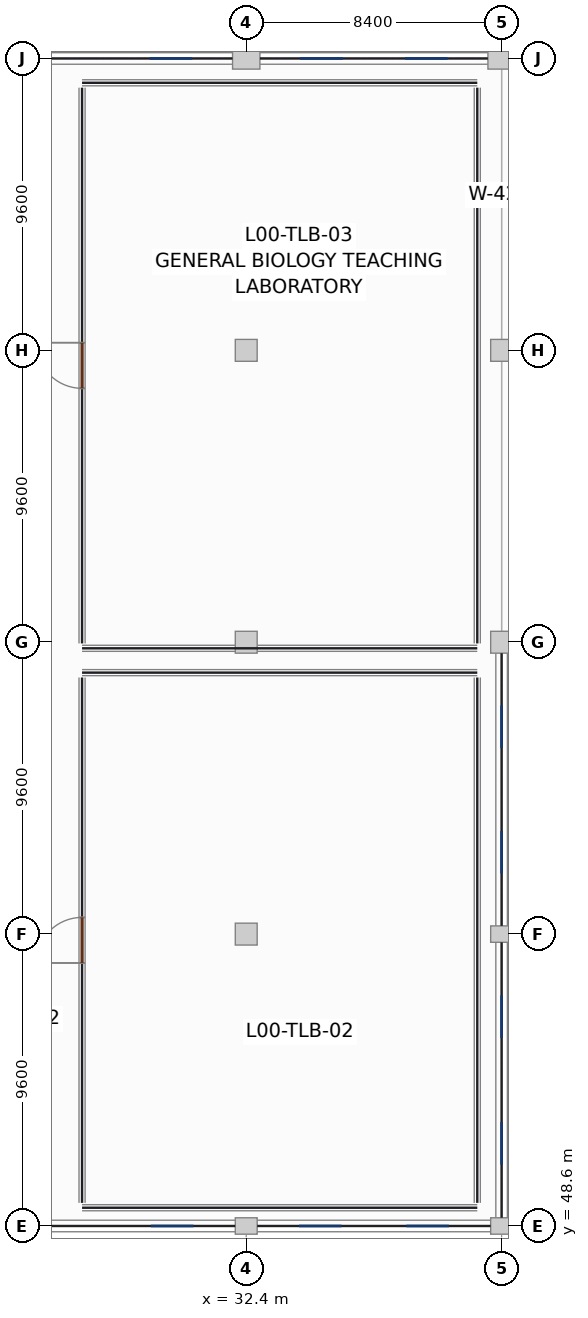
"""IFC4 building model, lengths in metres.
Left out: names, types, materials, properties, quantities, classifications, styles, units other than length and angle.
Written with IfcOpenShell. Run it as: python <this file> out.ifc"""

import sys

from ifc_helpers import new_model, si_unit, direction, frame, frame_2d, origin, origin_2d, place, context, subcontext, project, spatial, rectangle, extrude, element, fill, save


model = new_model("IFC4")
c1 = context("Model", 3, precision=1e-05, world=origin(), true_north=direction((0.0, 1.0)))
c2 = subcontext(c1, "Body", "Model", "MODEL_VIEW")
j1 = project(units=[si_unit("LENGTHUNIT", "METRE"), si_unit("PLANEANGLEUNIT", "RADIAN")], contexts=[c1])
p1 = place(None, origin())
s1 = spatial("IfcSite", under=j1, at=p1, CompositionType="ELEMENT")
p2 = place(p1, origin())
s2 = spatial("IfcBuilding", under=s1, at=p2, CompositionType="ELEMENT")
p3 = place(p2, origin())
s3 = spatial("IfcBuildingStorey", under=s2, at=p3, CompositionType="ELEMENT", Elevation=0.0)
p4 = place(p3, frame((32.4, 48.6, 0.0), z_axis=(0.0, 0.0, 1.0), x_axis=(1.0, 0.0, 0.0)))
e1 = element("IfcColumn", 1, at=p4, inside=s3, PredefinedType="COLUMN", context=c2, shape_type="SweptSolid", body=[
    extrude(rectangle(XDim=0.72, YDim=0.54, at=origin_2d()), origin(), (0.0, 0.0, 1.0), 5.08),
])
for number, where, z_axis, x_axis in (
    (2, (32.4, 58.2, 0.0), (0.0, 0.0, 1.0), (1.0, 0.0, 0.0)),
    (3, (32.4, 67.8, 0.0), (0.0, 0.0, 1.0), (1.0, 0.0, 0.0)),
    (4, (32.4, 77.4, 0.0), (0.0, 0.0, 1.0), (1.0, 0.0, 0.0)),
):
    element("IfcColumn", number, at=place(p3, frame(where, z_axis=z_axis, x_axis=x_axis)), inside=s3, PredefinedType="COLUMN", context=c2, shape_type="SweptSolid", body=[
        extrude(rectangle(XDim=0.72, YDim=0.72, at=origin_2d()), origin(), (0.0, 0.0, 1.0), 5.08),
    ])
p5 = place(p3, frame((32.4, 87.0, 0.0), z_axis=(0.0, 0.0, 1.0), x_axis=(1.0, 0.0, 0.0)))
e5 = element("IfcColumn", 5, at=p5, inside=s3, PredefinedType="COLUMN", context=c2, shape_type="SweptSolid", body=[
    extrude(rectangle(XDim=0.9, YDim=0.7, at=origin_2d()), origin(), (0.0, 0.0, 1.0), 5.08),
])
for number, where, z_axis, x_axis in (
    (6, (40.8, 48.6, 0.0), (0.0, 0.0, 1.0), (1.0, 0.0, 0.0)),
    (7, (40.8, 58.2, 0.0), (0.0, 0.0, 1.0), (1.0, 0.0, 0.0)),
):
    element("IfcColumn", number, at=place(p3, frame(where, z_axis=z_axis, x_axis=x_axis)), inside=s3, PredefinedType="COLUMN", context=c2, shape_type="SweptSolid", body=[
        extrude(rectangle(XDim=0.72, YDim=0.54, at=origin_2d()), origin(), (0.0, 0.0, 1.0), 5.08),
    ])
for number, where, z_axis, x_axis in (
    (8, (40.8, 67.8, 0.0), (0.0, 0.0, 1.0), (1.0, 0.0, 0.0)),
    (9, (40.8, 77.4, 0.0), (0.0, 0.0, 1.0), (1.0, 0.0, 0.0)),
):
    element("IfcColumn", number, at=place(p3, frame(where, z_axis=z_axis, x_axis=x_axis)), inside=s3, PredefinedType="COLUMN", context=c2, shape_type="SweptSolid", body=[
        extrude(rectangle(XDim=0.72, YDim=0.72, at=origin_2d()), origin(), (0.0, 0.0, 1.0), 5.08),
    ])
p6 = place(p3, frame((40.8, 87.0, 0.0), z_axis=(0.0, 0.0, 1.0), x_axis=(1.0, 0.0, 0.0)))
e10 = element("IfcColumn", 10, at=p6, inside=s3, PredefinedType="COLUMN", context=c2, shape_type="SweptSolid", body=[
    extrude(rectangle(XDim=0.9, YDim=0.7, at=origin_2d()), origin(), (0.0, 0.0, 1.0), 5.08),
])
p7 = place(p3, frame((40.8, 48.872, 0.0), z_axis=(0.0, 0.0, 1.0), x_axis=(0.0, 1.0, 0.0)))
e11 = element("IfcWall", 11, at=p7, inside=s3, PredefinedType="SOLIDWALL", context=c2, shape_type="SweptSolid", body=[
    extrude(rectangle(XDim=9.056, YDim=0.38, at=frame_2d((4.528, 0.0))), origin(), (0.0, 0.0, 1.0), 4.28),
])
p8 = place(p7, frame((1.745, 0.0, 0.85)))
e12 = element("IfcOpeningElement", 12, at=p8, cuts=e11, PredefinedType="OPENING", context=c2, shape_type="SweptSolid", body=[
    extrude(rectangle(XDim=1.4, YDim=1.65, at=frame_2d((0.7, 0.825))), frame((0.0, 0.2, 0.0), z_axis=(0.0, -1.0, 0.0), x_axis=(1.0, 0.0, 0.0)), (0.0, 0.0, 1.0), 0.4),
])
p9 = place(p7, frame((5.911, 0.0, 0.85)))
e13 = element("IfcOpeningElement", 13, at=p9, cuts=e11, PredefinedType="OPENING", context=c2, shape_type="SweptSolid", body=[
    extrude(rectangle(XDim=1.4, YDim=1.65, at=frame_2d((0.7, 0.825))), frame((0.0, 0.2, 0.0), z_axis=(0.0, -1.0, 0.0), x_axis=(1.0, 0.0, 0.0)), (0.0, 0.0, 1.0), 0.4),
])
p10 = place(p3, frame((40.8, 58.472, 0.0), z_axis=(0.0, 0.0, 1.0), x_axis=(0.0, 1.0, 0.0)))
e14 = element("IfcWall", 14, at=p10, inside=s3, PredefinedType="SOLIDWALL", context=c2, shape_type="SweptSolid", body=[
    extrude(rectangle(XDim=8.966, YDim=0.38, at=frame_2d((4.483, 0.0))), origin(), (0.0, 0.0, 1.0), 4.28),
])
p11 = place(p10, frame((1.721, 0.0, 0.85)))
e15 = element("IfcOpeningElement", 15, at=p11, cuts=e14, PredefinedType="OPENING", context=c2, shape_type="SweptSolid", body=[
    extrude(rectangle(XDim=1.4, YDim=1.65, at=frame_2d((0.7, 0.825))), frame((0.0, 0.2, 0.0), z_axis=(0.0, -1.0, 0.0), x_axis=(1.0, 0.0, 0.0)), (0.0, 0.0, 1.0), 0.4),
])
p12 = place(p10, frame((5.845, 0.0, 0.85)))
e16 = element("IfcOpeningElement", 16, at=p12, cuts=e14, PredefinedType="OPENING", context=c2, shape_type="SweptSolid", body=[
    extrude(rectangle(XDim=1.4, YDim=1.65, at=frame_2d((0.7, 0.825))), frame((0.0, 0.2, 0.0), z_axis=(0.0, -1.0, 0.0), x_axis=(1.0, 0.0, 0.0)), (0.0, 0.0, 1.0), 0.4),
])
p13 = place(p3, frame((24.362, 48.6, 0.0), z_axis=(0.0, 0.0, 1.0), x_axis=(1.0, 0.0, 0.0)))
e17 = element("IfcWall", 17, at=p13, inside=s3, PredefinedType="SOLIDWALL", context=c2, shape_type="SweptSolid", body=[
    extrude(rectangle(XDim=7.676, YDim=0.38, at=frame_2d((3.838, 0.0))), origin(), (0.0, 0.0, 1.0), 4.28),
])
p14 = place(p13, frame((4.904, 0.0, 0.85)))
e18 = element("IfcOpeningElement", 18, at=p14, cuts=e17, PredefinedType="OPENING", context=c2, shape_type="SweptSolid", body=[
    extrude(rectangle(XDim=1.4, YDim=1.65, at=frame_2d((0.7, 0.825))), frame((0.0, 0.2, 0.0), z_axis=(0.0, -1.0, 0.0), x_axis=(1.0, 0.0, 0.0)), (0.0, 0.0, 1.0), 0.4),
])
p15 = place(p3, frame((32.762, 48.6, 0.0), z_axis=(0.0, 0.0, 1.0), x_axis=(1.0, 0.0, 0.0)))
e19 = element("IfcWall", 19, at=p15, inside=s3, PredefinedType="SOLIDWALL", context=c2, shape_type="SweptSolid", body=[
    extrude(rectangle(XDim=7.676, YDim=0.38, at=frame_2d((3.838, 0.0))), origin(), (0.0, 0.0, 1.0), 4.28),
])
p16 = place(p15, frame((1.373, 0.0, 0.85)))
e20 = element("IfcOpeningElement", 20, at=p16, cuts=e19, PredefinedType="OPENING", context=c2, shape_type="SweptSolid", body=[
    extrude(rectangle(XDim=1.4, YDim=1.65, at=frame_2d((0.7, 0.825))), frame((0.0, 0.2, 0.0), z_axis=(0.0, -1.0, 0.0), x_axis=(1.0, 0.0, 0.0)), (0.0, 0.0, 1.0), 0.4),
])
p17 = place(p15, frame((4.904, 0.0, 0.85)))
e21 = element("IfcOpeningElement", 21, at=p17, cuts=e19, PredefinedType="OPENING", context=c2, shape_type="SweptSolid", body=[
    extrude(rectangle(XDim=1.4, YDim=1.65, at=frame_2d((0.7, 0.825))), frame((0.0, 0.2, 0.0), z_axis=(0.0, -1.0, 0.0), x_axis=(1.0, 0.0, 0.0)), (0.0, 0.0, 1.0), 0.4),
])
p18 = place(p3, frame((24.452, 87.0, 0.0), z_axis=(0.0, 0.0, 1.0), x_axis=(1.0, 0.0, 0.0)))
e22 = element("IfcWall", 22, at=p18, inside=s3, PredefinedType="SOLIDWALL", context=c2, shape_type="SweptSolid", body=[
    extrude(rectangle(XDim=7.496, YDim=0.38, at=frame_2d((3.748, 0.0))), origin(), (0.0, 0.0, 1.0), 4.28),
])
p19 = place(p18, frame((4.772, 0.0, 0.85)))
e23 = element("IfcOpeningElement", 23, at=p19, cuts=e22, PredefinedType="OPENING", context=c2, shape_type="SweptSolid", body=[
    extrude(rectangle(XDim=1.4, YDim=1.65, at=frame_2d((0.7, 0.825))), frame((0.0, 0.2, 0.0), z_axis=(0.0, -1.0, 0.0), x_axis=(1.0, 0.0, 0.0)), (0.0, 0.0, 1.0), 0.4),
])
p20 = place(p3, frame((32.852, 87.0, 0.0), z_axis=(0.0, 0.0, 1.0), x_axis=(1.0, 0.0, 0.0)))
e24 = element("IfcWall", 24, at=p20, inside=s3, PredefinedType="SOLIDWALL", context=c2, shape_type="SweptSolid", body=[
    extrude(rectangle(XDim=7.496, YDim=0.38, at=frame_2d((3.748, 0.0))), origin(), (0.0, 0.0, 1.0), 4.28),
])
p21 = place(p20, frame((1.324, 0.0, 0.85)))
e25 = element("IfcOpeningElement", 25, at=p21, cuts=e24, PredefinedType="OPENING", context=c2, shape_type="SweptSolid", body=[
    extrude(rectangle(XDim=1.4, YDim=1.65, at=frame_2d((0.7, 0.825))), frame((0.0, 0.2, 0.0), z_axis=(0.0, -1.0, 0.0), x_axis=(1.0, 0.0, 0.0)), (0.0, 0.0, 1.0), 0.4),
])
p22 = place(p20, frame((4.772, 0.0, 0.85)))
e26 = element("IfcOpeningElement", 26, at=p22, cuts=e24, PredefinedType="OPENING", context=c2, shape_type="SweptSolid", body=[
    extrude(rectangle(XDim=1.4, YDim=1.65, at=frame_2d((0.7, 0.825))), frame((0.0, 0.2, 0.0), z_axis=(0.0, -1.0, 0.0), x_axis=(1.0, 0.0, 0.0)), (0.0, 0.0, 1.0), 0.4),
])
for number, where, z_axis, x_axis in (
    (27, (27.0, 49.2, 0.0), (0.0, 0.0, 1.0), (1.0, 0.0, 0.0)),
    (28, (27.0, 66.8, 0.0), (0.0, 0.0, 1.0), (1.0, 0.0, 0.0)),
):
    element("IfcWall", number, at=place(p3, frame(where, z_axis=z_axis, x_axis=x_axis)), inside=s3, PredefinedType="PARTITIONING", context=c2, shape_type="SweptSolid", body=[
        extrude(rectangle(XDim=13.0, YDim=0.2, at=frame_2d((6.5, 0.0))), origin(), (0.0, 0.0, 1.0), 4.12),
    ])
p23 = place(p3, frame((27.0, 49.36, 0.0), z_axis=(0.0, 0.0, 1.0), x_axis=(0.0, 1.0, 0.0)))
e29 = element("IfcWall", 29, at=p23, inside=s3, PredefinedType="PARTITIONING", context=c2, shape_type="SweptSolid", body=[
    extrude(rectangle(XDim=17.28, YDim=0.2, at=frame_2d((8.64, 0.0))), origin(), (0.0, 0.0, 1.0), 4.12),
])
p24 = place(p23, frame((7.89, 0.0, 0.0)))
e30 = element("IfcOpeningElement", 30, at=p24, cuts=e29, PredefinedType="OPENING", context=c2, shape_type="SweptSolid", body=[
    extrude(rectangle(XDim=1.5, YDim=2.2, at=frame_2d((0.75, 1.1))), frame((0.0, 0.11, 0.0), z_axis=(0.0, -1.0, 0.0), x_axis=(1.0, 0.0, 0.0)), (0.0, 0.0, 1.0), 0.22),
])
p25 = place(p3, frame((40.0, 49.36, 0.0), z_axis=(0.0, 0.0, 1.0), x_axis=(0.0, 1.0, 0.0)))
e31 = element("IfcWall", 31, at=p25, inside=s3, PredefinedType="PARTITIONING", context=c2, shape_type="SweptSolid", body=[
    extrude(rectangle(XDim=17.28, YDim=0.2, at=frame_2d((8.64, 0.0))), origin(), (0.0, 0.0, 1.0), 4.12),
])
for number, where, z_axis, x_axis in (
    (32, (27.0, 67.6, 0.0), (0.0, 0.0, 1.0), (1.0, 0.0, 0.0)),
    (33, (27.0, 86.2, 0.0), (0.0, 0.0, 1.0), (1.0, 0.0, 0.0)),
):
    element("IfcWall", number, at=place(p3, frame(where, z_axis=z_axis, x_axis=x_axis)), inside=s3, PredefinedType="PARTITIONING", context=c2, shape_type="SweptSolid", body=[
        extrude(rectangle(XDim=13.0, YDim=0.2, at=frame_2d((6.5, 0.0))), origin(), (0.0, 0.0, 1.0), 4.12),
    ])
p26 = place(p3, frame((27.0, 67.76, 0.0), z_axis=(0.0, 0.0, 1.0), x_axis=(0.0, 1.0, 0.0)))
e34 = element("IfcWall", 34, at=p26, inside=s3, PredefinedType="PARTITIONING", context=c2, shape_type="SweptSolid", body=[
    extrude(rectangle(XDim=18.28, YDim=0.2, at=frame_2d((9.14, 0.0))), origin(), (0.0, 0.0, 1.0), 4.12),
])
p27 = place(p26, frame((8.39, 0.0, 0.0)))
e35 = element("IfcOpeningElement", 35, at=p27, cuts=e34, PredefinedType="OPENING", context=c2, shape_type="SweptSolid", body=[
    extrude(rectangle(XDim=1.5, YDim=2.2, at=frame_2d((0.75, 1.1))), frame((0.0, 0.11, 0.0), z_axis=(0.0, -1.0, 0.0), x_axis=(1.0, 0.0, 0.0)), (0.0, 0.0, 1.0), 0.22),
])
p28 = place(p3, frame((40.0, 67.76, 0.0), z_axis=(0.0, 0.0, 1.0), x_axis=(0.0, 1.0, 0.0)))
e36 = element("IfcWall", 36, at=p28, inside=s3, PredefinedType="PARTITIONING", context=c2, shape_type="SweptSolid", body=[
    extrude(rectangle(XDim=18.28, YDim=0.2, at=frame_2d((9.14, 0.0))), origin(), (0.0, 0.0, 1.0), 4.12),
])
p29 = place(p8, origin())
e37 = element("IfcWindow", 37, at=p29, inside=s3, PartitioningType="SINGLE_PANEL", PredefinedType="WINDOW", context=c2, shape_type="SweptSolid", body=[
    extrude(rectangle(XDim=1.4, YDim=1.65, at=frame_2d((0.7, 0.825))), frame((0.0, 0.03, 0.0), z_axis=(0.0, -1.0, 0.0), x_axis=(1.0, 0.0, 0.0)), (0.0, 0.0, 1.0), 0.06),
])
fill(e12, e37)
p30 = place(p9, origin())
e38 = element("IfcWindow", 38, at=p30, inside=s3, PartitioningType="SINGLE_PANEL", PredefinedType="WINDOW", context=c2, shape_type="SweptSolid", body=[
    extrude(rectangle(XDim=1.4, YDim=1.65, at=frame_2d((0.7, 0.825))), frame((0.0, 0.03, 0.0), z_axis=(0.0, -1.0, 0.0), x_axis=(1.0, 0.0, 0.0)), (0.0, 0.0, 1.0), 0.06),
])
fill(e13, e38)
p31 = place(p11, origin())
e39 = element("IfcWindow", 39, at=p31, inside=s3, PartitioningType="SINGLE_PANEL", PredefinedType="WINDOW", context=c2, shape_type="SweptSolid", body=[
    extrude(rectangle(XDim=1.4, YDim=1.65, at=frame_2d((0.7, 0.825))), frame((0.0, 0.03, 0.0), z_axis=(0.0, -1.0, 0.0), x_axis=(1.0, 0.0, 0.0)), (0.0, 0.0, 1.0), 0.06),
])
fill(e15, e39)
p32 = place(p12, origin())
e40 = element("IfcWindow", 40, at=p32, inside=s3, PartitioningType="SINGLE_PANEL", PredefinedType="WINDOW", context=c2, shape_type="SweptSolid", body=[
    extrude(rectangle(XDim=1.4, YDim=1.65, at=frame_2d((0.7, 0.825))), frame((0.0, 0.03, 0.0), z_axis=(0.0, -1.0, 0.0), x_axis=(1.0, 0.0, 0.0)), (0.0, 0.0, 1.0), 0.06),
])
fill(e16, e40)
p33 = place(p14, origin())
e41 = element("IfcWindow", 41, at=p33, inside=s3, PartitioningType="SINGLE_PANEL", PredefinedType="WINDOW", context=c2, shape_type="SweptSolid", body=[
    extrude(rectangle(XDim=1.4, YDim=1.65, at=frame_2d((0.7, 0.825))), frame((0.0, 0.03, 0.0), z_axis=(0.0, -1.0, 0.0), x_axis=(1.0, 0.0, 0.0)), (0.0, 0.0, 1.0), 0.06),
])
fill(e18, e41)
p34 = place(p16, origin())
e42 = element("IfcWindow", 42, at=p34, inside=s3, PartitioningType="SINGLE_PANEL", PredefinedType="WINDOW", context=c2, shape_type="SweptSolid", body=[
    extrude(rectangle(XDim=1.4, YDim=1.65, at=frame_2d((0.7, 0.825))), frame((0.0, 0.03, 0.0), z_axis=(0.0, -1.0, 0.0), x_axis=(1.0, 0.0, 0.0)), (0.0, 0.0, 1.0), 0.06),
])
fill(e20, e42)
p35 = place(p17, origin())
e43 = element("IfcWindow", 43, at=p35, inside=s3, PartitioningType="SINGLE_PANEL", PredefinedType="WINDOW", context=c2, shape_type="SweptSolid", body=[
    extrude(rectangle(XDim=1.4, YDim=1.65, at=frame_2d((0.7, 0.825))), frame((0.0, 0.03, 0.0), z_axis=(0.0, -1.0, 0.0), x_axis=(1.0, 0.0, 0.0)), (0.0, 0.0, 1.0), 0.06),
])
fill(e21, e43)
p36 = place(p19, origin())
e44 = element("IfcWindow", 44, at=p36, inside=s3, PartitioningType="SINGLE_PANEL", PredefinedType="WINDOW", context=c2, shape_type="SweptSolid", body=[
    extrude(rectangle(XDim=1.4, YDim=1.65, at=frame_2d((0.7, 0.825))), frame((0.0, 0.03, 0.0), z_axis=(0.0, -1.0, 0.0), x_axis=(1.0, 0.0, 0.0)), (0.0, 0.0, 1.0), 0.06),
])
fill(e23, e44)
p37 = place(p21, origin())
e45 = element("IfcWindow", 45, at=p37, inside=s3, PartitioningType="SINGLE_PANEL", PredefinedType="WINDOW", context=c2, shape_type="SweptSolid", body=[
    extrude(rectangle(XDim=1.4, YDim=1.65, at=frame_2d((0.7, 0.825))), frame((0.0, 0.03, 0.0), z_axis=(0.0, -1.0, 0.0), x_axis=(1.0, 0.0, 0.0)), (0.0, 0.0, 1.0), 0.06),
])
fill(e25, e45)
p38 = place(p22, origin())
e46 = element("IfcWindow", 46, at=p38, inside=s3, PartitioningType="SINGLE_PANEL", PredefinedType="WINDOW", context=c2, shape_type="SweptSolid", body=[
    extrude(rectangle(XDim=1.4, YDim=1.65, at=frame_2d((0.7, 0.825))), frame((0.0, 0.03, 0.0), z_axis=(0.0, -1.0, 0.0), x_axis=(1.0, 0.0, 0.0)), (0.0, 0.0, 1.0), 0.06),
])
fill(e26, e46)
p39 = place(p24, origin())
e47 = element("IfcDoor", 47, at=p39, inside=s3, OperationType="SINGLE_SWING_LEFT", PredefinedType="DOOR", context=c2, shape_type="SweptSolid", body=[
    extrude(rectangle(XDim=1.5, YDim=2.2, at=frame_2d((0.75, 1.1))), frame((0.0, 0.025, 0.0), z_axis=(0.0, -1.0, 0.0), x_axis=(1.0, 0.0, 0.0)), (0.0, 0.0, 1.0), 0.05),
])
fill(e30, e47)
p40 = place(p27, origin())
e48 = element("IfcDoor", 48, at=p40, inside=s3, OperationType="SINGLE_SWING_RIGHT", PredefinedType="DOOR", context=c2, shape_type="SweptSolid", body=[
    extrude(rectangle(XDim=1.5, YDim=2.2, at=frame_2d((0.75, 1.1))), frame((0.0, 0.025, 0.0), z_axis=(0.0, -1.0, 0.0), x_axis=(1.0, 0.0, 0.0)), (0.0, 0.0, 1.0), 0.05),
])
fill(e35, e48)
save(model, sys.argv[1])
